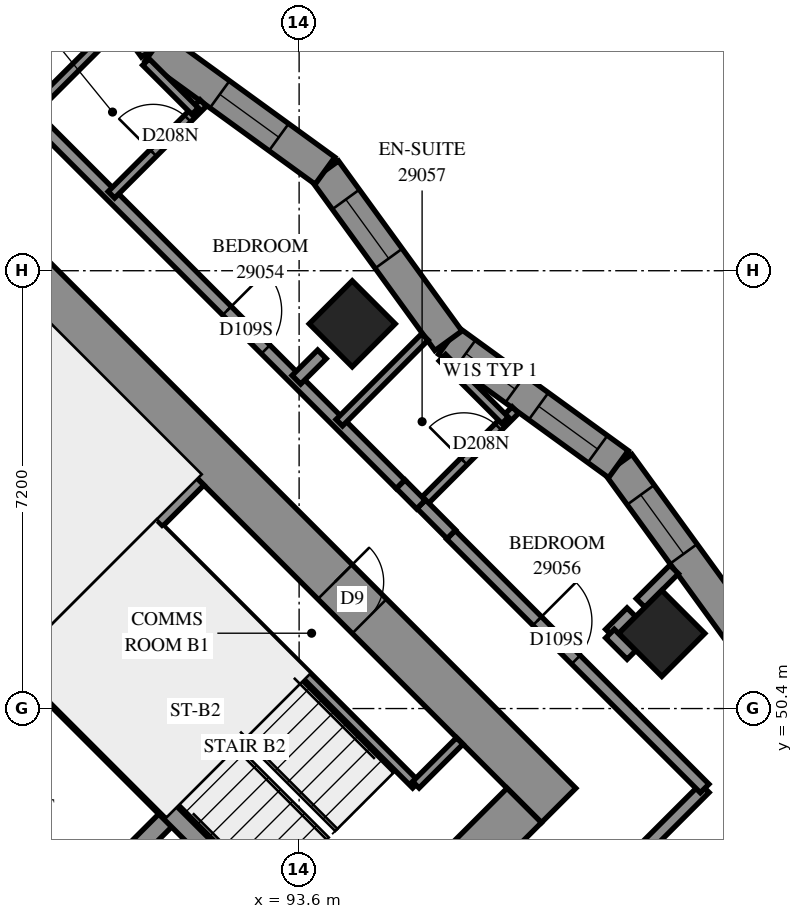
"""IFC4 building model, lengths in metres.
Left out: names, types, materials, properties, quantities, classifications, styles, units other than length and angle.
Written with IfcOpenShell. Run it as: python <this file> out.ifc"""

import sys

from ifc_helpers import new_model, si_unit, direction, frame, frame_2d, origin, origin_2d, place, context, subcontext, project, spatial, polyline, rectangle, outline, extrude, element, fill, save


model = new_model("IFC4")
c1 = context("Model", 3, precision=1e-05, world=origin(), true_north=direction((0.0, 1.0)))
c2 = subcontext(c1, "Body", "Model", "MODEL_VIEW")
j1 = project(units=[si_unit("LENGTHUNIT", "METRE"), si_unit("PLANEANGLEUNIT", "RADIAN")], contexts=[c1])
p1 = place(None, origin())
s1 = spatial("IfcSite", under=j1, at=p1, CompositionType="ELEMENT")
p2 = place(p1, origin())
s2 = spatial("IfcBuilding", under=s1, at=p2, CompositionType="ELEMENT")
p3 = place(p2, frame((0.0, 0.0, 108.4)))
s3 = spatial("IfcBuildingStorey", under=s2, at=p3, CompositionType="ELEMENT", Elevation=108.4)
for number, where, z_axis, x_axis in (
    (1, (89.382, 61.818, 0.0), (0.0, 0.0, 1.0), (0.707, -0.707, 0.0)),
    (2, (94.474, 56.727, 0.0), (0.0, 0.0, 1.0), (0.707, -0.707, 0.0)),
    (3, (99.565, 51.635, 0.0), (0.0, 0.0, 1.0), (0.707, -0.707, 0.0)),
):
    element("IfcColumn", number, at=place(p3, frame(where, z_axis=z_axis, x_axis=x_axis)), inside=s3, PredefinedType="COLUMN", context=c2, shape_type="SweptSolid", body=[
        extrude(rectangle(XDim=1.0, YDim=1.0, at=origin_2d()), origin(), (0.0, 0.0, 1.0), 3.1),
    ])
p4 = place(p3, frame((86.554, 60.121, -0.3), z_axis=(0.0, 0.0, 1.0), x_axis=(0.7071067812, -0.7071067812, 0.0)))
e4 = element("IfcWall", 4, at=p4, inside=s3, PredefinedType="SHEAR", context=c2, shape_type="SweptSolid", body=[
    extrude(rectangle(XDim=16.0, YDim=0.8, at=frame_2d((8.0, 0.0))), origin(), (0.0, 0.0, 1.0), 2.7),
])
p5 = place(p4, frame((10.8, 0.0, 0.3)))
e5 = element("IfcOpeningElement", 5, at=p5, cuts=e4, PredefinedType="OPENING", context=c2, shape_type="SweptSolid", body=[
    extrude(rectangle(XDim=0.8, YDim=2.1, at=frame_2d((0.4, 1.05))), frame((0.0, 0.41, 0.0), z_axis=(0.0, -1.0, 0.0), x_axis=(1.0, 0.0, 0.0)), (0.0, 0.0, 1.0), 0.82),
])
p6 = place(p3, frame((87.12, 38.625, -0.3), z_axis=(0.0, 0.0, 1.0), x_axis=(0.7071067812, 0.7071067812, 0.0)))
e6 = element("IfcWall", 6, at=p6, inside=s3, PredefinedType="SHEAR", context=c2, shape_type="SweptSolid", body=[
    extrude(rectangle(XDim=14.4, YDim=0.8, at=frame_2d((7.2, 0.0))), origin(), (0.0, 0.0, 1.0), 2.7),
])
p7 = place(p6, frame((4.55, 0.0, 0.3)))
e7 = element("IfcOpeningElement", 7, at=p7, cuts=e6, PredefinedType="OPENING", context=c2, shape_type="SweptSolid", body=[
    extrude(rectangle(XDim=1.1, YDim=2.1, at=frame_2d((0.55, 1.05))), frame((0.0, 0.41, 0.0), z_axis=(0.0, -1.0, 0.0), x_axis=(1.0, 0.0, 0.0)), (0.0, 0.0, 1.0), 0.82),
])
p8 = place(p6, frame((11.35, 0.0, 0.3)))
e8 = element("IfcOpeningElement", 8, at=p8, cuts=e6, PredefinedType="OPENING", context=c2, shape_type="SweptSolid", body=[
    extrude(rectangle(XDim=1.1, YDim=2.1, at=frame_2d((0.55, 1.05))), frame((0.0, 0.41, 0.0), z_axis=(0.0, -1.0, 0.0), x_axis=(1.0, 0.0, 0.0)), (0.0, 0.0, 1.0), 0.82),
])
p9 = place(p3, frame((89.17, 46.332, 0.0), z_axis=(0.0, 0.0, 1.0), x_axis=(0.7071067812, 0.7071067812, 0.0)))
e9 = element("IfcWall", 9, at=p9, inside=s3, PredefinedType="SOLIDWALL", context=c2, shape_type="SweptSolid", body=[
    extrude(rectangle(XDim=3.3, YDim=0.3, at=frame_2d((1.65, 0.0))), origin(), (0.0, 0.0, 1.0), 3.1),
])
p10 = place(p3, frame((81.534, 53.969, 0.0), z_axis=(0.0, 0.0, 1.0), x_axis=(0.707103309, -0.7071102534, 0.0)))
e10 = element("IfcWall", 10, at=p10, inside=s3, PredefinedType="SOLIDWALL", context=c2, shape_type="SweptSolid", body=[
    extrude(rectangle(XDim=14.4, YDim=0.3, at=frame_2d((7.2, 0.0))), origin(), (0.0, 0.0, 1.0), 3.1),
])
p11 = place(p10, frame((12.05, 0.0, 0.0)))
e11 = element("IfcOpeningElement", 11, at=p11, cuts=e10, PredefinedType="OPENING", context=c2, shape_type="SweptSolid", body=[
    extrude(rectangle(XDim=1.1, YDim=2.1, at=frame_2d((0.55, 1.05))), frame((0.0, 0.16, 0.0), z_axis=(0.0, -1.0, 0.0), x_axis=(1.0, 0.0, 0.0)), (0.0, 0.0, 1.0), 0.32),
])
p12 = place(p3, frame((88.958, 51.211, 0.0), z_axis=(0.0, 0.0, 1.0), x_axis=(0.7070998367, -0.7071137256, 0.0)))
e12 = element("IfcWall", 12, at=p12, inside=s3, PredefinedType="SOLIDWALL", context=c2, shape_type="SweptSolid", body=[
    extrude(rectangle(XDim=7.2, YDim=0.3, at=frame_2d((3.6, 0.0))), origin(), (0.0, 0.0, 1.0), 3.1),
])
p13 = place(p3, frame((88.958, 51.211, 0.0), z_axis=(0.0, 0.0, 1.0), x_axis=(0.7071067812, 0.7071067812, 0.0)))
e13 = element("IfcWall", 13, at=p13, inside=s3, PredefinedType="SOLIDWALL", context=c2, shape_type="SweptSolid", body=[
    extrude(rectangle(XDim=4.2, YDim=0.3, at=frame_2d((2.1, 0.0))), origin(), (0.0, 0.0, 1.0), 3.1),
])
p14 = place(p3, frame((100.88, 51.623, 0.0), z_axis=(0.0, 0.0, 1.0), x_axis=(-0.5874228075, 0.8092802019, 0.0)))
e14 = element("IfcWall", 14, at=p14, inside=s3, PredefinedType="SOLIDWALL", context=c2, shape_type="SweptSolid", body=[
    extrude(outline(polyline([(0.044, -0.275), (3.499, -0.275), (3.411, 0.275), (-0.044, 0.275), (0.044, -0.275)])), origin(), (0.0, 0.0, 1.0), 3.1),
])
p15 = place(p14, frame((1.631, 0.0, 0.5)))
e15 = element("IfcOpeningElement", 15, at=p15, cuts=e14, PredefinedType="OPENING", context=c2, shape_type="SweptSolid", body=[
    extrude(rectangle(XDim=1.2, YDim=2.45, at=frame_2d((0.6, 1.225))), frame((0.0, 0.285, 0.0), z_axis=(0.0, -1.0, 0.0), x_axis=(1.0, 0.0, 0.0)), (0.0, 0.0, 1.0), 0.57),
])
p16 = place(p3, frame((98.851, 54.419, 0.0), z_axis=(0.0, 0.0, 1.0), x_axis=(-0.8092802019, 0.5874228075, 0.0)))
e16 = element("IfcWall", 16, at=p16, inside=s3, PredefinedType="SOLIDWALL", context=c2, shape_type="SweptSolid", body=[
    extrude(outline(polyline([(-0.044, -0.275), (3.411, -0.275), (3.499, 0.275), (0.044, 0.275), (-0.044, -0.275)])), origin(), (0.0, 0.0, 1.0), 3.1),
])
p17 = place(p16, frame((0.422, 0.0, 0.5)))
e17 = element("IfcOpeningElement", 17, at=p17, cuts=e16, PredefinedType="OPENING", context=c2, shape_type="SweptSolid", body=[
    extrude(rectangle(XDim=1.2, YDim=2.45, at=frame_2d((0.6, 1.225))), frame((0.0, 0.285, 0.0), z_axis=(0.0, -1.0, 0.0), x_axis=(1.0, 0.0, 0.0)), (0.0, 0.0, 1.0), 0.57),
])
p18 = place(p16, frame((2.1, 0.0, 0.45)))
e18 = element("IfcOpeningElement", 18, at=p18, cuts=e16, PredefinedType="OPENING", context=c2, shape_type="SweptSolid", body=[
    extrude(rectangle(XDim=1.0, YDim=2.5, at=frame_2d((0.5, 1.25))), frame((0.0, 0.285, 0.0), z_axis=(0.0, -1.0, 0.0), x_axis=(1.0, 0.0, 0.0)), (0.0, 0.0, 1.0), 0.57),
])
p19 = place(p3, frame((96.055, 56.448, 0.0), z_axis=(0.0, 0.0, 1.0), x_axis=(-0.5874228075, 0.8092802019, 0.0)))
e19 = element("IfcWall", 19, at=p19, inside=s3, PredefinedType="SOLIDWALL", context=c2, shape_type="SweptSolid", body=[
    extrude(outline(polyline([(0.044, -0.275), (3.499, -0.275), (3.411, 0.275), (-0.044, 0.275), (0.044, -0.275)])), origin(), (0.0, 0.0, 1.0), 3.1),
])
p20 = place(p19, frame((1.671, 0.0, 0.5)))
e20 = element("IfcOpeningElement", 20, at=p20, cuts=e19, PredefinedType="OPENING", context=c2, shape_type="SweptSolid", body=[
    extrude(rectangle(XDim=1.2, YDim=2.45, at=frame_2d((0.6, 1.225))), frame((0.0, 0.285, 0.0), z_axis=(0.0, -1.0, 0.0), x_axis=(1.0, 0.0, 0.0)), (0.0, 0.0, 1.0), 0.57),
])
p21 = place(p3, frame((94.025, 59.244, 0.0), z_axis=(0.0, 0.0, 1.0), x_axis=(-0.8092802019, 0.5874228075, 0.0)))
e21 = element("IfcWall", 21, at=p21, inside=s3, PredefinedType="SOLIDWALL", context=c2, shape_type="SweptSolid", body=[
    extrude(outline(polyline([(-0.044, -0.275), (3.411, -0.275), (3.499, 0.275), (0.044, 0.275), (-0.044, -0.275)])), origin(), (0.0, 0.0, 1.0), 3.1),
])
p22 = place(p21, frame((0.938, 0.0, 0.5)))
e22 = element("IfcOpeningElement", 22, at=p22, cuts=e21, PredefinedType="OPENING", context=c2, shape_type="SweptSolid", body=[
    extrude(rectangle(XDim=1.2, YDim=2.45, at=frame_2d((0.6, 1.225))), frame((0.0, 0.285, 0.0), z_axis=(0.0, -1.0, 0.0), x_axis=(1.0, 0.0, 0.0)), (0.0, 0.0, 1.0), 0.57),
])
p23 = place(p3, frame((91.23, 61.274, 0.0), z_axis=(0.0, 0.0, 1.0), x_axis=(-0.5874228075, 0.8092802019, 0.0)))
e23 = element("IfcWall", 23, at=p23, inside=s3, PredefinedType="SOLIDWALL", context=c2, shape_type="SweptSolid", body=[
    extrude(outline(polyline([(0.044, -0.275), (3.499, -0.275), (3.411, 0.275), (-0.044, 0.275), (0.044, -0.275)])), origin(), (0.0, 0.0, 1.0), 3.1),
])
p24 = place(p23, frame((1.862, 0.0, 0.5)))
e24 = element("IfcOpeningElement", 24, at=p24, cuts=e23, PredefinedType="OPENING", context=c2, shape_type="SweptSolid", body=[
    extrude(rectangle(XDim=1.2, YDim=2.45, at=frame_2d((0.6, 1.225))), frame((0.0, 0.285, 0.0), z_axis=(0.0, -1.0, 0.0), x_axis=(1.0, 0.0, 0.0)), (0.0, 0.0, 1.0), 0.57),
])
p25 = place(p23, frame((0.883, 0.0, 0.45)))
e25 = element("IfcOpeningElement", 25, at=p25, cuts=e23, PredefinedType="OPENING", context=c2, shape_type="SweptSolid", body=[
    extrude(rectangle(XDim=0.8, YDim=2.5, at=frame_2d((0.4, 1.25))), frame((0.0, 0.285, 0.0), z_axis=(0.0, -1.0, 0.0), x_axis=(1.0, 0.0, 0.0)), (0.0, 0.0, 1.0), 0.57),
])
p26 = place(p3, frame((91.313, 53.354, 0.0), z_axis=(0.0, 0.0, 1.0), x_axis=(0.7071067812, -0.7071067812, 0.0)))
e26 = element("IfcWall", 26, at=p26, inside=s3, PredefinedType="PARTITIONING", context=c2, shape_type="SweptSolid", body=[
    extrude(rectangle(XDim=5.95, YDim=0.15, at=frame_2d((2.975, 0.0))), origin(), (0.0, 0.0, 1.0), 3.1),
])
p27 = place(p3, frame((95.52, 49.146, 0.0), z_axis=(0.0, 0.0, 1.0), x_axis=(0.7071067812, 0.7071067812, 0.0)))
e27 = element("IfcWall", 27, at=p27, inside=s3, PredefinedType="PARTITIONING", context=c2, shape_type="SweptSolid", body=[
    extrude(rectangle(XDim=1.02, YDim=0.15, at=frame_2d((0.51, 0.0))), origin(), (0.0, 0.0, 1.0), 3.1),
])
p28 = place(p3, frame((94.331, 41.313, 0.0), z_axis=(0.0, 0.0, 1.0), x_axis=(0.7071109253, 0.7071026371, 0.0)))
e28 = element("IfcWall", 28, at=p28, inside=s3, PredefinedType="PARTITIONING", context=c2, shape_type="SweptSolid", body=[
    extrude(rectangle(XDim=12.065, YDim=0.2, at=frame_2d((6.033, 0.0))), origin(), (0.0, 0.0, 1.0), 3.1),
])
p29 = place(p3, frame((87.894, 61.461, 0.0), z_axis=(0.0, 0.0, 1.0), x_axis=(0.7071067812, -0.7071067812, 0.0)))
e29 = element("IfcWall", 29, at=p29, inside=s3, PredefinedType="PARTITIONING", context=c2, shape_type="SweptSolid", body=[
    extrude(rectangle(XDim=10.428, YDim=0.2, at=frame_2d((5.214, 0.0))), origin(), (0.0, 0.0, 1.0), 3.1),
])
p30 = place(p29, frame((6.39, 0.0, 0.0)))
e30 = element("IfcOpeningElement", 30, at=p30, cuts=e29, PredefinedType="OPENING", context=c2, shape_type="SweptSolid", body=[
    extrude(rectangle(XDim=0.9, YDim=2.1, at=frame_2d((0.45, 1.05))), frame((0.0, 0.11, 0.0), z_axis=(0.0, -1.0, 0.0), x_axis=(1.0, 0.0, 0.0)), (0.0, 0.0, 1.0), 0.22),
])
p31 = place(p3, frame((93.413, 42.233, 0.0), z_axis=(0.0, 0.0, 1.0), x_axis=(0.7071067812, 0.7071067812, 0.0)))
e31 = element("IfcWall", 31, at=p31, inside=s3, PredefinedType="PARTITIONING", context=c2, shape_type="SweptSolid", body=[
    extrude(rectangle(XDim=9.699, YDim=0.2, at=frame_2d((4.849, 0.0))), origin(), (0.0, 0.0, 1.0), 3.1),
])
p32 = place(p31, frame((0.249, 0.0, 0.0)))
e32 = element("IfcOpeningElement", 32, at=p32, cuts=e31, PredefinedType="OPENING", context=c2, shape_type="SweptSolid", body=[
    extrude(rectangle(XDim=1.0, YDim=2.1, at=frame_2d((0.5, 1.05))), frame((0.0, 0.11, 0.0), z_axis=(0.0, -1.0, 0.0), x_axis=(1.0, 0.0, 0.0)), (0.0, 0.0, 1.0), 0.22),
])
p33 = place(p3, frame((96.097, 53.258, 0.0), z_axis=(0.0, 0.0, 1.0), x_axis=(0.7071067812, -0.7071067812, 0.0)))
e33 = element("IfcWall", 33, at=p33, inside=s3, PredefinedType="PARTITIONING", context=c2, shape_type="SweptSolid", body=[
    extrude(rectangle(XDim=5.9, YDim=0.2, at=frame_2d((2.95, 0.0))), origin(), (0.0, 0.0, 1.0), 3.1),
])
p34 = place(p33, frame((2.006, 0.0, 0.0)))
e34 = element("IfcOpeningElement", 34, at=p34, cuts=e33, PredefinedType="OPENING", context=c2, shape_type="SweptSolid", body=[
    extrude(rectangle(XDim=0.9, YDim=2.1, at=frame_2d((0.45, 1.05))), frame((0.0, 0.11, 0.0), z_axis=(0.0, -1.0, 0.0), x_axis=(1.0, 0.0, 0.0)), (0.0, 0.0, 1.0), 0.22),
])
p35 = place(p3, frame((95.605, 53.759, 0.0), z_axis=(0.0, 0.0, 1.0), x_axis=(0.7071067812, 0.7071067812, 0.0)))
e35 = element("IfcWall", 35, at=p35, inside=s3, PredefinedType="PARTITIONING", context=c2, shape_type="SweptSolid", body=[
    extrude(rectangle(XDim=2.193, YDim=0.15, at=frame_2d((1.096, 0.0))), origin(), (0.0, 0.0, 1.0), 3.1),
])
p36 = place(p35, frame((0.997, 0.0, 0.0)))
e36 = element("IfcOpeningElement", 36, at=p36, cuts=e35, PredefinedType="OPENING", context=c2, shape_type="SweptSolid", body=[
    extrude(rectangle(XDim=0.8, YDim=2.1, at=frame_2d((0.4, 1.05))), frame((0.0, 0.085, 0.0), z_axis=(0.0, -1.0, 0.0), x_axis=(1.0, 0.0, 0.0)), (0.0, 0.0, 1.0), 0.17),
])
p37 = place(p3, frame((90.513, 58.849, 0.0), z_axis=(0.0, 0.0, 1.0), x_axis=(0.7071302035, 0.7070833581, 0.0)))
e37 = element("IfcWall", 37, at=p37, inside=s3, PredefinedType="PARTITIONING", context=c2, shape_type="SweptSolid", body=[
    extrude(rectangle(XDim=2.135, YDim=0.15, at=frame_2d((1.067, 0.0))), origin(), (0.0, 0.0, 1.0), 3.1),
])
p38 = place(p37, frame((0.972, 0.0, 0.0)))
e38 = element("IfcOpeningElement", 38, at=p38, cuts=e37, PredefinedType="OPENING", context=c2, shape_type="SweptSolid", body=[
    extrude(rectangle(XDim=0.8, YDim=2.1, at=frame_2d((0.4, 1.05))), frame((0.0, 0.085, 0.0), z_axis=(0.0, -1.0, 0.0), x_axis=(1.0, 0.0, 0.0)), (0.0, 0.0, 1.0), 0.17),
])
p39 = place(p3, frame((89.169, 60.193, 0.0), z_axis=(0.0, 0.0, 1.0), x_axis=(0.7076425233, 0.7065706329, 0.0)))
e39 = element("IfcWall", 39, at=p39, inside=s3, PredefinedType="PARTITIONING", context=c2, shape_type="SweptSolid", body=[
    extrude(rectangle(XDim=2.052, YDim=0.15, at=frame_2d((1.026, 0.0))), origin(), (0.0, 0.0, 1.0), 3.1),
])
p40 = place(p3, frame((94.261, 55.101, 0.0), z_axis=(0.0, 0.0, 1.0), x_axis=(0.7065546876, 0.7076584441, 0.0)))
e40 = element("IfcWall", 40, at=p40, inside=s3, PredefinedType="PARTITIONING", context=c2, shape_type="SweptSolid", body=[
    extrude(rectangle(XDim=1.993, YDim=0.15, at=frame_2d((0.997, 0.0))), origin(), (0.0, 0.0, 1.0), 3.1),
])
p41 = place(p3, frame((95.957, 56.17, 0.0), z_axis=(0.0, 0.0, 1.0), x_axis=(0.7071067812, -0.7071067812, 0.0)))
e41 = element("IfcWall", 41, at=p41, inside=s3, PredefinedType="PARTITIONING", context=c2, shape_type="SweptSolid", body=[
    extrude(rectangle(XDim=1.457, YDim=0.15, at=frame_2d((0.729, 0.0))), origin(), (0.0, 0.0, 1.0), 3.1),
])
p42 = place(p3, frame((91.08, 61.033, 0.0), z_axis=(0.0, 0.0, 1.0), x_axis=(0.7071067812, -0.7071067812, 0.0)))
e42 = element("IfcWall", 42, at=p42, inside=s3, PredefinedType="PARTITIONING", context=c2, shape_type="SweptSolid", body=[
    extrude(rectangle(XDim=1.145, YDim=0.15, at=frame_2d((0.572, 0.0))), origin(), (0.0, 0.0, 1.0), 3.1),
])
p43 = place(p3, frame((99.216, 52.136, 0.0), z_axis=(0.0, 0.0, 1.0), x_axis=(0.7070426997, 0.7071708568, 0.0)))
e43 = element("IfcWall", 43, at=p43, inside=s3, PredefinedType="PARTITIONING", context=c2, shape_type="SweptSolid", body=[
    extrude(rectangle(XDim=0.78, YDim=0.2, at=frame_2d((0.39, 0.0))), origin(), (0.0, 0.0, 1.0), 3.1),
])
p44 = place(p3, frame((95.609, 53.761, 0.0), z_axis=(0.0, 0.0, 1.0), x_axis=(0.7056768426, -0.7085338339, 0.0)))
e44 = element("IfcWall", 44, at=p44, inside=s3, PredefinedType="PARTITIONING", context=c2, shape_type="SweptSolid", body=[
    extrude(rectangle(XDim=0.7, YDim=0.2, at=frame_2d((0.35, 0.0))), origin(), (0.0, 0.0, 1.0), 3.1),
])
p45 = place(p3, frame((93.555, 55.807, 0.0), z_axis=(0.0, 0.0, 1.0), x_axis=(0.7087923682, 0.7054171665, 0.0)))
e45 = element("IfcWall", 45, at=p45, inside=s3, PredefinedType="PARTITIONING", context=c2, shape_type="SweptSolid", body=[
    extrude(rectangle(XDim=0.593, YDim=0.2, at=frame_2d((0.296, 0.0))), origin(), (0.0, 0.0, 1.0), 3.1),
])
for number, where, z_axis, x_axis in (
    (46, (98.712, 51.632, 0.0), (0.0, 0.0, 1.0), (0.707, 0.707, 0.0)),
    (47, (98.713, 51.633, 0.0), (0.0, 0.0, 1.0), (0.707, -0.707, 0.0)),
):
    element("IfcWall", number, at=place(p3, frame(where, z_axis=z_axis, x_axis=x_axis)), inside=s3, PredefinedType="PARTITIONING", context=c2, shape_type="SweptSolid", body=[
        extrude(rectangle(XDim=0.498, YDim=0.2, at=frame_2d((0.249, 0.0))), origin(), (0.0, 0.0, 1.0), 3.1),
    ])
p46 = place(p3, frame((95.271, 54.089, 0.0), z_axis=(0.0, 0.0, 1.0), x_axis=(0.7049801586, -0.7092270271, 0.0)))
e48 = element("IfcWall", 48, at=p46, inside=s3, PredefinedType="PARTITIONING", context=c2, shape_type="SweptSolid", body=[
    extrude(rectangle(XDim=0.471, YDim=0.2, at=frame_2d((0.235, 0.0))), origin(), (0.0, 0.0, 1.0), 3.1),
])
p47 = place(p15, origin())
e49 = element("IfcWindow", 49, at=p47, inside=s3, PartitioningType="SINGLE_PANEL", PredefinedType="WINDOW", context=c2, shape_type="SweptSolid", body=[
    extrude(rectangle(XDim=1.2, YDim=2.45, at=frame_2d((0.6, 1.225))), frame((0.0, 0.155, 0.0), z_axis=(0.0, -1.0, 0.0), x_axis=(1.0, 0.0, 0.0)), (0.0, 0.0, 1.0), 0.06),
])
fill(e15, e49)
p48 = place(p20, origin())
e50 = element("IfcWindow", 50, at=p48, inside=s3, PartitioningType="SINGLE_PANEL", PredefinedType="WINDOW", context=c2, shape_type="SweptSolid", body=[
    extrude(rectangle(XDim=1.2, YDim=2.45, at=frame_2d((0.6, 1.225))), frame((0.0, 0.155, 0.0), z_axis=(0.0, -1.0, 0.0), x_axis=(1.0, 0.0, 0.0)), (0.0, 0.0, 1.0), 0.06),
])
fill(e20, e50)
p49 = place(p22, origin())
e51 = element("IfcWindow", 51, at=p49, inside=s3, PartitioningType="SINGLE_PANEL", PredefinedType="WINDOW", context=c2, shape_type="SweptSolid", body=[
    extrude(rectangle(XDim=1.2, YDim=2.45, at=frame_2d((0.6, 1.225))), frame((0.0, 0.155, 0.0), z_axis=(0.0, -1.0, 0.0), x_axis=(1.0, 0.0, 0.0)), (0.0, 0.0, 1.0), 0.06),
])
fill(e22, e51)
p50 = place(p5, origin())
e52 = element("IfcDoor", 52, at=p50, inside=s3, OperationType="SINGLE_SWING_RIGHT", PredefinedType="DOOR", context=c2, shape_type="SweptSolid", body=[
    extrude(rectangle(XDim=0.8, YDim=2.1, at=frame_2d((0.4, 1.05))), frame((0.0, -0.34, 0.0), z_axis=(0.0, -1.0, 0.0), x_axis=(1.0, 0.0, 0.0)), (0.0, 0.0, 1.0), 0.05),
])
fill(e5, e52)
p51 = place(p30, origin())
e53 = element("IfcDoor", 53, at=p51, inside=s3, OperationType="SINGLE_SWING_LEFT", PredefinedType="DOOR", context=c2, shape_type="SweptSolid", body=[
    extrude(rectangle(XDim=0.9, YDim=2.1, at=frame_2d((0.45, 1.05))), frame((0.0, 0.025, 0.0), z_axis=(0.0, -1.0, 0.0), x_axis=(1.0, 0.0, 0.0)), (0.0, 0.0, 1.0), 0.05),
])
fill(e30, e53)
p52 = place(p38, origin())
e54 = element("IfcDoor", 54, at=p52, inside=s3, OperationType="SINGLE_SWING_RIGHT", PredefinedType="DOOR", context=c2, shape_type="SweptSolid", body=[
    extrude(rectangle(XDim=0.8, YDim=2.1, at=frame_2d((0.4, 1.05))), frame((0.0, 0.025, 0.0), z_axis=(0.0, -1.0, 0.0), x_axis=(1.0, 0.0, 0.0)), (0.0, 0.0, 1.0), 0.05),
])
fill(e38, e54)
p53 = place(p34, origin())
e55 = element("IfcDoor", 55, at=p53, inside=s3, OperationType="SINGLE_SWING_LEFT", PredefinedType="DOOR", context=c2, shape_type="SweptSolid", body=[
    extrude(rectangle(XDim=0.9, YDim=2.1, at=frame_2d((0.45, 1.05))), frame((0.0, 0.025, 0.0), z_axis=(0.0, -1.0, 0.0), x_axis=(1.0, 0.0, 0.0)), (0.0, 0.0, 1.0), 0.05),
])
fill(e34, e55)
p54 = place(p36, origin())
e56 = element("IfcDoor", 56, at=p54, inside=s3, OperationType="SINGLE_SWING_RIGHT", PredefinedType="DOOR", context=c2, shape_type="SweptSolid", body=[
    extrude(rectangle(XDim=0.8, YDim=2.1, at=frame_2d((0.4, 1.05))), frame((0.0, 0.025, 0.0), z_axis=(0.0, -1.0, 0.0), x_axis=(1.0, 0.0, 0.0)), (0.0, 0.0, 1.0), 0.05),
])
fill(e36, e56)
p55 = place(p17, origin())
e57 = element("IfcWindow", 57, at=p55, inside=s3, PartitioningType="SINGLE_PANEL", PredefinedType="WINDOW", context=c2, shape_type="SweptSolid", body=[
    extrude(rectangle(XDim=1.2, YDim=2.45, at=frame_2d((0.6, 1.225))), frame((0.0, 0.155, 0.0), z_axis=(0.0, -1.0, 0.0), x_axis=(1.0, 0.0, 0.0)), (0.0, 0.0, 1.0), 0.06),
])
fill(e17, e57)
p56 = place(p18, origin())
e58 = element("IfcWindow", 58, at=p56, inside=s3, PartitioningType="SINGLE_PANEL", PredefinedType="WINDOW", context=c2, shape_type="SweptSolid", body=[
    extrude(rectangle(XDim=1.0, YDim=2.5, at=frame_2d((0.5, 1.25))), frame((0.0, 0.155, 0.0), z_axis=(0.0, -1.0, 0.0), x_axis=(1.0, 0.0, 0.0)), (0.0, 0.0, 1.0), 0.06),
])
fill(e18, e58)
save(model, sys.argv[1])
